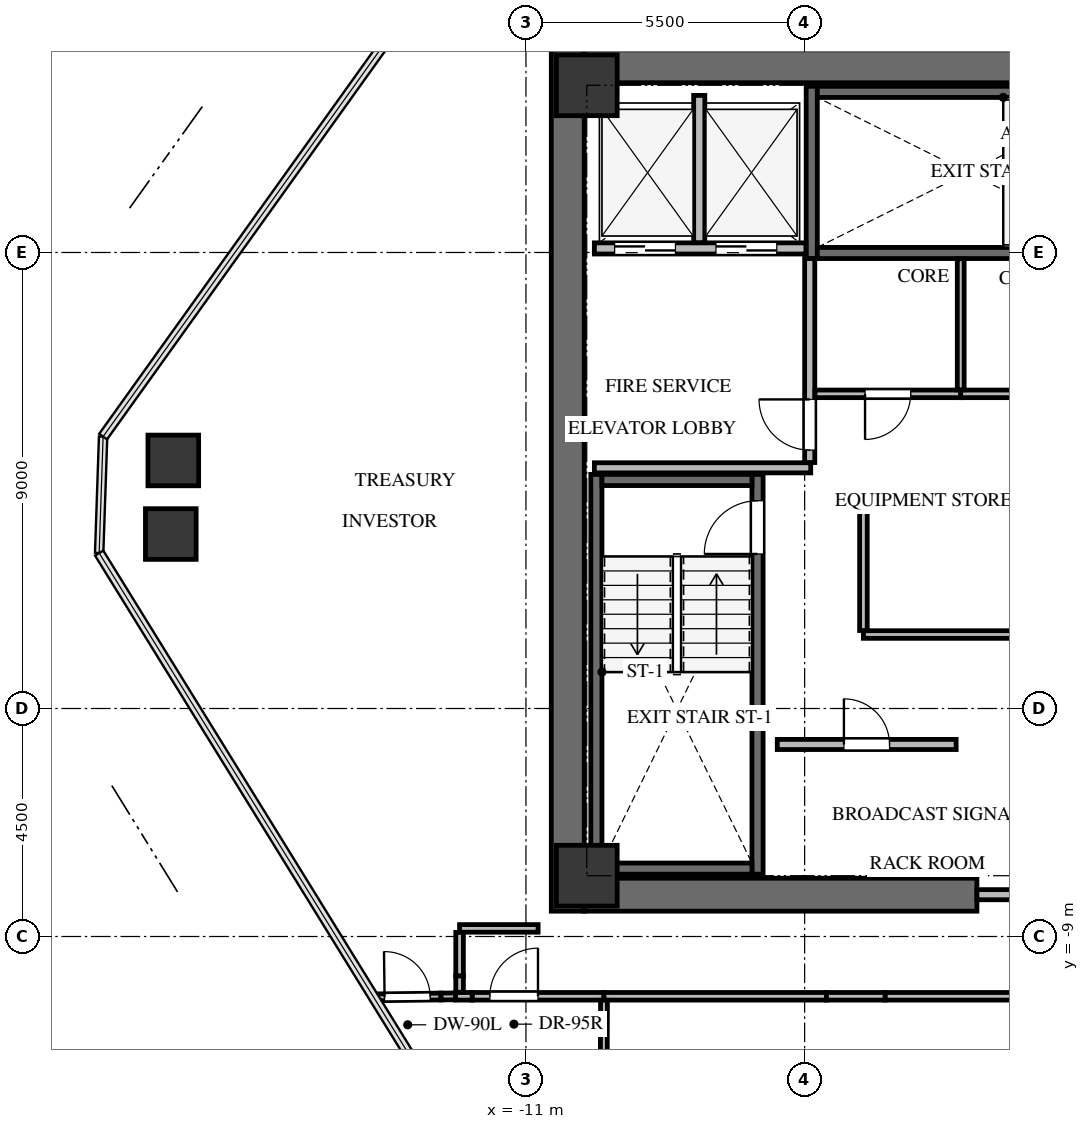
"""IFC4 building model, lengths in metres.
Left out: names, types, materials, properties, quantities, classifications, styles, units other than length and angle.
Written with IfcOpenShell. Run it as: python <this file> out.ifc"""

import sys

from ifc_helpers import new_model, si_unit, direction, frame, frame_2d, origin, origin_2d, place, context, subcontext, project, spatial, rectangle, extrude, source, transform, mapped, element, fill, save


model = new_model("IFC4")
c1 = context("Model", 3, precision=1e-05, world=origin(), true_north=direction((0.0, 1.0)))
c2 = subcontext(c1, "Body", "Model", "MODEL_VIEW")
j1 = project(units=[si_unit("LENGTHUNIT", "METRE"), si_unit("PLANEANGLEUNIT", "RADIAN")], contexts=[c1])
p1 = place(None, origin())
s1 = spatial("IfcSite", under=j1, at=p1, CompositionType="ELEMENT")
p2 = place(p1, origin())
s2 = spatial("IfcBuilding", under=s1, at=p2, CompositionType="ELEMENT")
p3 = place(p2, frame((0.0, 0.0, 200.2)))
s3 = spatial("IfcBuildingStorey", under=s2, at=p3, CompositionType="ELEMENT", Elevation=200.2)
p4 = place(p3, frame((-10.175, -8.5, 0.0), z_axis=(0.0, 0.0, 1.0), x_axis=(0.0, 1.0, 0.0)))
e1 = element("IfcWall", 1, at=p4, inside=s3, PredefinedType="SHEAR", context=c2, shape_type="SweptSolid", body=[
    extrude(rectangle(XDim=17.0, YDim=0.65, at=frame_2d((8.5, 0.0))), origin(), (0.0, 0.0, 1.0), 3.0),
])
p5 = place(p3, frame((-9.85, -8.175, 0.0), z_axis=(0.0, 0.0, 1.0), x_axis=(1.0, 0.0, 0.0)))
e2 = element("IfcWall", 2, at=p5, inside=s3, PredefinedType="SHEAR", context=c2, shape_type="SweptSolid", body=[
    extrude(rectangle(XDim=7.75, YDim=0.65, at=frame_2d((3.875, 0.0))), origin(), (0.0, 0.0, 1.0), 3.0),
])
p6 = place(p3, frame((-9.85, 8.175, 0.0), z_axis=(0.0, 0.0, 1.0), x_axis=(1.0, 0.0, 0.0)))
e3 = element("IfcWall", 3, at=p6, inside=s3, PredefinedType="SHEAR", context=c2, shape_type="SweptSolid", body=[
    extrude(rectangle(XDim=19.7, YDim=0.65, at=frame_2d((9.85, 0.0))), origin(), (0.0, 0.0, 1.0), 3.0),
])
p7 = place(p3, frame((-6.43, -7.77, -0.24), z_axis=(0.0, 0.0, 1.0), x_axis=(0.0, 1.0, 0.0)))
e4 = element("IfcWall", 4, at=p7, inside=s3, PredefinedType="SHEAR", context=c2, shape_type="SweptSolid", body=[
    extrude(rectangle(XDim=7.89, YDim=0.22, at=frame_2d((3.945, 0.0))), origin(), (0.0, 0.0, 1.0), 3.0),
])
p8 = place(p7, frame((6.32, 0.0, 0.0)))
e5 = element("IfcOpeningElement", 5, at=p8, cuts=e4, PredefinedType="OPENING", context=c2, shape_type="SweptSolid", body=[
    extrude(rectangle(XDim=1.05, YDim=2.15, at=frame_2d((0.525, 1.075))), frame((0.0, 0.12, 0.0), z_axis=(0.0, -1.0, 0.0), x_axis=(1.0, 0.0, 0.0)), (0.0, 0.0, 1.0), 0.24),
])
p9 = place(p3, frame((-9.61, 0.12, -0.24), z_axis=(0.0, 0.0, 1.0), x_axis=(0.0, -1.0, 0.0)))
e6 = element("IfcWall", 6, at=p9, inside=s3, PredefinedType="SHEAR", context=c2, shape_type="SweptSolid", body=[
    extrude(rectangle(XDim=7.89, YDim=0.22, at=frame_2d((3.945, 0.0))), origin(), (0.0, 0.0, 1.0), 3.0),
])
for number, where, z_axis, x_axis in (
    (7, (-9.5, -7.66, -0.24), (0.0, 0.0, 1.0), (1.0, 0.0, 0.0)),
    (8, (-6.54, 0.01, -0.24), (0.0, 0.0, 1.0), (-1.0, 0.0, 0.0)),
):
    element("IfcWall", number, at=place(p3, frame(where, z_axis=z_axis, x_axis=x_axis)), inside=s3, PredefinedType="SHEAR", context=c2, shape_type="SweptSolid", body=[
        extrude(rectangle(XDim=2.96, YDim=0.22, at=frame_2d((1.48, 0.0))), origin(), (0.0, 0.0, 1.0), 3.0),
    ])
p10 = place(p3, frame((-5.36, 7.78, -0.24), z_axis=(0.0, 0.0, 1.0), x_axis=(0.0, -1.0, 0.0)))
e9 = element("IfcWall", 9, at=p10, inside=s3, PredefinedType="SHEAR", context=c2, shape_type="SweptSolid", body=[
    extrude(rectangle(XDim=3.4, YDim=0.22, at=frame_2d((1.7, 0.0))), origin(), (0.0, 0.0, 1.0), 3.0),
])
p11 = place(p3, frame((-5.25, 4.49, -0.24), z_axis=(0.0, 0.0, 1.0), x_axis=(1.0, 0.0, 0.0)))
e10 = element("IfcWall", 10, at=p11, inside=s3, PredefinedType="SHEAR", context=c2, shape_type="SweptSolid", body=[
    extrude(rectangle(XDim=7.35, YDim=0.22, at=frame_2d((3.675, 0.0))), origin(), (0.0, 0.0, 1.0), 3.0),
])
p12 = place(p11, frame((5.85, 0.0, 0.0)))
e11 = element("IfcOpeningElement", 11, at=p12, cuts=e10, PredefinedType="OPENING", context=c2, shape_type="SweptSolid", body=[
    extrude(rectangle(XDim=1.05, YDim=2.15, at=frame_2d((0.525, 1.075))), frame((0.0, 0.12, 0.0), z_axis=(0.0, -1.0, 0.0), x_axis=(1.0, 0.0, 0.0)), (0.0, 0.0, 1.0), 0.24),
])
p13 = place(p3, frame((2.1, 7.67, -0.24), z_axis=(0.0, 0.0, 1.0), x_axis=(-1.0, 0.0, 0.0)))
e12 = element("IfcWall", 12, at=p13, inside=s3, PredefinedType="SHEAR", context=c2, shape_type="SweptSolid", body=[
    extrude(rectangle(XDim=7.35, YDim=0.22, at=frame_2d((3.675, 0.0))), origin(), (0.0, 0.0, 1.0), 3.0),
])
m1 = source(origin(), c2, "Body", "SweptSolid", [
    extrude(rectangle(XDim=1.2, YDim=1.2, at=origin_2d()), origin(), (0.0, 0.0, 1.0), 3.0),
])
for number, where, z_axis, x_axis in (
    (13, (-9.8, -7.8, -0.24), (0.0, 0.0, 1.0), (1.0, 0.0, 0.0)),
    (14, (-9.8, 7.8, -0.24), (0.0, 0.0, 1.0), (1.0, 0.0, 0.0)),
):
    element("IfcColumn", number, at=place(p3, frame(where, z_axis=z_axis, x_axis=x_axis)), inside=s3, PredefinedType="COLUMN", context=c2, shape_type="MappedRepresentation", body=[
        mapped(m1, transform((0.0, 0.0, 0.0), x_axis=(1.0, 0.0, 0.0), y_axis=(0.0, 1.0, 0.0), z_axis=(0.0, 0.0, 1.0), scale=1.0)),
    ])
m2 = source(origin(), c2, "Body", "SweptSolid", [
    extrude(rectangle(XDim=1.0, YDim=1.0, at=origin_2d()), origin(), (0.0, 0.0, 1.0), 3.0),
])
for number, where, z_axis, x_axis in (
    (15, (-18.009, -1.057, -0.24), (0.0, 0.0, 1.0), (1.0, 0.0, 0.0)),
    (16, (-17.96, 0.396, -0.24), (0.0, 0.0, 1.0), (1.0, 0.0, 0.0)),
):
    element("IfcColumn", number, at=place(p3, frame(where, z_axis=z_axis, x_axis=x_axis)), inside=s3, PredefinedType="COLUMN", context=c2, shape_type="MappedRepresentation", body=[
        mapped(m2, transform((0.0, 0.0, 0.0), x_axis=(1.0, 0.0, 0.0), y_axis=(0.0, 1.0, 0.0), z_axis=(0.0, 0.0, 1.0), scale=1.0)),
    ])
p14 = place(p3, frame((-2.1, -8.175, 0.0), z_axis=(0.0, 0.0, 1.0), x_axis=(1.0, 0.0, 0.0)))
e17 = element("IfcWall", 17, at=p14, inside=s3, PredefinedType="SOLIDWALL", context=c2, shape_type="SweptSolid", body=[
    extrude(rectangle(XDim=4.2, YDim=0.2, at=frame_2d((2.1, 0.0))), origin(), (0.0, 0.0, 1.0), 2.745),
])
p15 = place(p14, frame((1.2, 0.0, 0.0)))
e18 = element("IfcOpeningElement", 18, at=p15, cuts=e17, PredefinedType="OPENING", context=c2, shape_type="SweptSolid", body=[
    extrude(rectangle(XDim=1.8, YDim=2.15, at=frame_2d((0.9, 1.075))), frame((0.0, 0.11, 0.0), z_axis=(0.0, -1.0, 0.0), x_axis=(1.0, 0.0, 0.0)), (0.0, 0.0, 1.0), 0.22),
])
p16 = place(p3, frame((-9.65, 4.58, 0.0), z_axis=(0.0, 0.0, 1.0), x_axis=(1.0, 0.0, 0.0)))
e19 = element("IfcWall", 19, at=p16, inside=s3, PredefinedType="SOLIDWALL", context=c2, shape_type="SweptSolid", body=[
    extrude(rectangle(XDim=4.175, YDim=0.22, at=frame_2d((2.087, 0.0))), origin(), (0.0, 0.0, 1.0), 2.745),
])
p17 = place(p16, frame((0.4, 0.0, 0.0)))
e20 = element("IfcOpeningElement", 20, at=p17, cuts=e19, PredefinedType="OPENING", context=c2, shape_type="SweptSolid", body=[
    extrude(rectangle(XDim=1.2, YDim=2.15, at=frame_2d((0.6, 1.075))), frame((0.0, 0.12, 0.0), z_axis=(0.0, -1.0, 0.0), x_axis=(1.0, 0.0, 0.0)), (0.0, 0.0, 1.0), 0.24),
])
p18 = place(p16, frame((2.4, 0.0, 0.0)))
e21 = element("IfcOpeningElement", 21, at=p18, cuts=e19, PredefinedType="OPENING", context=c2, shape_type="SweptSolid", body=[
    extrude(rectangle(XDim=1.2, YDim=2.15, at=frame_2d((0.6, 1.075))), frame((0.0, 0.12, 0.0), z_axis=(0.0, -1.0, 0.0), x_axis=(1.0, 0.0, 0.0)), (0.0, 0.0, 1.0), 0.24),
])
p19 = place(p3, frame((-7.58, 4.694, 0.0), z_axis=(0.0, 0.0, 1.0), x_axis=(0.0, 1.0, 0.0)))
e22 = element("IfcWall", 22, at=p19, inside=s3, PredefinedType="SOLIDWALL", context=c2, shape_type="SweptSolid", body=[
    extrude(rectangle(XDim=2.906, YDim=0.22, at=frame_2d((1.453, 0.0))), origin(), (0.0, 0.0, 1.0), 2.745),
])
p20 = place(p3, frame((-9.65, 0.25, 0.0), z_axis=(0.0, 0.0, 1.0), x_axis=(1.0, 0.0, 0.0)))
e23 = element("IfcWall", 23, at=p20, inside=s3, PredefinedType="SOLIDWALL", context=c2, shape_type="SweptSolid", body=[
    extrude(rectangle(XDim=4.27, YDim=0.2, at=frame_2d((2.135, 0.0))), origin(), (0.0, 0.0, 1.0), 2.745),
])
p21 = place(p3, frame((-5.4, 0.354, 0.0), z_axis=(0.0, 0.0, 1.0), x_axis=(0.0, 1.0, 0.0)))
e24 = element("IfcWall", 24, at=p21, inside=s3, PredefinedType="SOLIDWALL", context=c2, shape_type="SweptSolid", body=[
    extrude(rectangle(XDim=4.026, YDim=0.2, at=frame_2d((2.013, 0.0))), origin(), (0.0, 0.0, 1.0), 2.745),
])
p22 = place(p21, frame((0.246, 0.0, 0.0)))
e25 = element("IfcOpeningElement", 25, at=p22, cuts=e24, PredefinedType="OPENING", context=c2, shape_type="SweptSolid", body=[
    extrude(rectangle(XDim=1.0, YDim=2.15, at=frame_2d((0.5, 1.075))), frame((0.0, 0.11, 0.0), z_axis=(0.0, -1.0, 0.0), x_axis=(1.0, 0.0, 0.0)), (0.0, 0.0, 1.0), 0.22),
])
p23 = place(p3, frame((-6.04, -5.21, 0.0), z_axis=(0.0, 0.0, 1.0), x_axis=(1.0, 0.0, 0.0)))
e26 = element("IfcWall", 26, at=p23, inside=s3, PredefinedType="SOLIDWALL", context=c2, shape_type="SweptSolid", body=[
    extrude(rectangle(XDim=3.53, YDim=0.2, at=frame_2d((1.765, 0.0))), origin(), (0.0, 0.0, 1.0), 2.745),
])
p24 = place(p23, frame((1.315, 0.0, 0.0)))
e27 = element("IfcOpeningElement", 27, at=p24, cuts=e26, PredefinedType="OPENING", context=c2, shape_type="SweptSolid", body=[
    extrude(rectangle(XDim=0.9, YDim=2.05, at=frame_2d((0.45, 1.025))), frame((0.0, 0.11, 0.0), z_axis=(0.0, -1.0, 0.0), x_axis=(1.0, 0.0, 0.0)), (0.0, 0.0, 1.0), 0.22),
])
p25 = place(p3, frame((3.14, -3.04, 0.0), z_axis=(0.0, 0.0, 1.0), x_axis=(-1.0, 0.0, 0.0)))
e28 = element("IfcWall", 28, at=p25, inside=s3, PredefinedType="PARTITIONING", context=c2, shape_type="SweptSolid", body=[
    extrude(rectangle(XDim=7.48, YDim=0.15, at=frame_2d((3.74, 0.0))), origin(), (0.0, 0.0, 1.0), 2.745),
])
p26 = place(p25, frame((3.29, 0.0, 0.0)))
e29 = element("IfcOpeningElement", 29, at=p26, cuts=e28, PredefinedType="OPENING", context=c2, shape_type="SweptSolid", body=[
    extrude(rectangle(XDim=0.9, YDim=2.05, at=frame_2d((0.45, 1.025))), frame((0.0, 0.085, 0.0), z_axis=(0.0, -1.0, 0.0), x_axis=(1.0, 0.0, 0.0)), (0.0, 0.0, 1.0), 0.17),
])
p27 = place(p3, frame((-4.34, -0.51, 0.0), z_axis=(0.0, 0.0, 1.0), x_axis=(1.0, 0.0, 0.0)))
e30 = element("IfcWall", 30, at=p27, inside=s3, PredefinedType="PARTITIONING", context=c2, shape_type="SweptSolid", body=[
    extrude(rectangle(XDim=7.48, YDim=0.15, at=frame_2d((3.74, 0.0))), origin(), (0.0, 0.0, 1.0), 2.745),
])
p28 = place(p3, frame((-4.34, -2.961, 0.0), z_axis=(0.0, 0.0, 1.0), x_axis=(0.0, 1.0, 0.0)))
e31 = element("IfcWall", 31, at=p28, inside=s3, PredefinedType="PARTITIONING", context=c2, shape_type="SweptSolid", body=[
    extrude(rectangle(XDim=2.372, YDim=0.15, at=frame_2d((1.186, 0.0))), origin(), (0.0, 0.0, 1.0), 2.745),
])
p29 = place(p3, frame((-2.42, 1.71, 0.0), z_axis=(0.0, 0.0, 1.0), x_axis=(-1.0, 0.0, 0.0)))
e32 = element("IfcWall", 32, at=p29, inside=s3, PredefinedType="PARTITIONING", context=c2, shape_type="SweptSolid", body=[
    extrude(rectangle(XDim=2.876, YDim=0.15, at=frame_2d((1.438, 0.0))), origin(), (0.0, 0.0, 1.0), 2.745),
])
p30 = place(p29, frame((0.988, 0.0, 0.0)))
e33 = element("IfcOpeningElement", 33, at=p30, cuts=e32, PredefinedType="OPENING", context=c2, shape_type="SweptSolid", body=[
    extrude(rectangle(XDim=0.9, YDim=2.05, at=frame_2d((0.45, 1.025))), frame((0.0, 0.085, 0.0), z_axis=(0.0, -1.0, 0.0), x_axis=(1.0, 0.0, 0.0)), (0.0, 0.0, 1.0), 0.17),
])
p31 = place(p3, frame((0.52, 1.71, 0.0), z_axis=(0.0, 0.0, 1.0), x_axis=(-1.0, 0.0, 0.0)))
e34 = element("IfcWall", 34, at=p31, inside=s3, PredefinedType="PARTITIONING", context=c2, shape_type="SweptSolid", body=[
    extrude(rectangle(XDim=2.94, YDim=0.15, at=frame_2d((1.47, 0.0))), origin(), (0.0, 0.0, 1.0), 2.745),
])
p32 = place(p31, frame((1.02, 0.0, 0.0)))
e35 = element("IfcOpeningElement", 35, at=p32, cuts=e34, PredefinedType="OPENING", context=c2, shape_type="SweptSolid", body=[
    extrude(rectangle(XDim=0.9, YDim=2.05, at=frame_2d((0.45, 1.025))), frame((0.0, 0.085, 0.0), z_axis=(0.0, -1.0, 0.0), x_axis=(1.0, 0.0, 0.0)), (0.0, 0.0, 1.0), 0.17),
])
p33 = place(p3, frame((-12.062, -10.18, 0.0), z_axis=(0.0, 0.0, 1.0), x_axis=(1.0, 0.0, 0.0)))
e36 = element("IfcWall", 36, at=p33, inside=s3, PredefinedType="PARTITIONING", context=c2, shape_type="SweptSolid", body=[
    extrude(rectangle(XDim=2.603, YDim=0.15, at=frame_2d((1.301, 0.0))), origin(), (0.0, 0.0, 1.0), 2.745),
])
p34 = place(p33, frame((0.35, 0.0, 0.0)))
e37 = element("IfcOpeningElement", 37, at=p34, cuts=e36, PredefinedType="OPENING", context=c2, shape_type="SweptSolid", body=[
    extrude(rectangle(XDim=0.95, YDim=2.1, at=frame_2d((0.475, 1.05))), frame((0.0, 0.085, 0.0), z_axis=(0.0, -1.0, 0.0), x_axis=(1.0, 0.0, 0.0)), (0.0, 0.0, 1.0), 0.17),
])
p35 = place(p3, frame((-12.39, -10.18, 0.0), z_axis=(0.0, 0.0, 1.0), x_axis=(1.0, 0.0, 0.0)))
e38 = element("IfcWall", 38, at=p35, inside=s3, PredefinedType="PARTITIONING", context=c2, shape_type="SweptSolid", body=[
    extrude(rectangle(XDim=0.327, YDim=0.15, at=frame_2d((0.164, 0.0))), origin(), (0.0, 0.0, 1.0), 2.099),
])
p36 = place(p3, frame((-9.46, -10.18, 0.0), z_axis=(0.0, 0.0, 1.0), x_axis=(1.0, 0.0, 0.0)))
e39 = element("IfcWall", 39, at=p36, inside=s3, PredefinedType="PARTITIONING", context=c2, shape_type="SweptSolid", body=[
    extrude(rectangle(XDim=4.39, YDim=0.15, at=frame_2d((2.195, 0.0))), origin(), (0.0, 0.0, 1.0), 2.745),
])
p37 = place(p3, frame((-3.913, -10.18, 0.0), z_axis=(0.0, 0.0, 1.0), x_axis=(1.0, 0.0, 0.0)))
e40 = element("IfcWall", 40, at=p37, inside=s3, PredefinedType="PARTITIONING", context=c2, shape_type="SweptSolid", body=[
    extrude(rectangle(XDim=2.903, YDim=0.15, at=frame_2d((1.451, 0.0))), origin(), (0.0, 0.0, 1.0), 2.745),
])
p38 = place(p3, frame((-5.07, -10.18, 0.0), z_axis=(0.0, 0.0, 1.0), x_axis=(1.0, 0.0, 0.0)))
e41 = element("IfcWall", 41, at=p38, inside=s3, PredefinedType="PARTITIONING", context=c2, shape_type="SweptSolid", body=[
    extrude(rectangle(XDim=1.157, YDim=0.15, at=frame_2d((0.579, 0.0))), origin(), (0.0, 0.0, 1.0), 1.942),
])
p39 = place(p3, frame((-10.76, -8.84, 0.0), z_axis=(0.0, 0.0, 1.0), x_axis=(-1.0, 0.0, 0.0)))
e42 = element("IfcWall", 42, at=p39, inside=s3, PredefinedType="PARTITIONING", context=c2, shape_type="SweptSolid", body=[
    extrude(rectangle(XDim=1.55, YDim=0.15, at=frame_2d((0.775, 0.0))), origin(), (0.0, 0.0, 1.0), 2.745),
])
p40 = place(p3, frame((-12.31, -8.919, 0.0), z_axis=(0.0, 0.0, 1.0), x_axis=(0.0, -1.0, 0.0)))
e43 = element("IfcWall", 43, at=p40, inside=s3, PredefinedType="PARTITIONING", context=c2, shape_type="SweptSolid", body=[
    extrude(rectangle(XDim=0.86, YDim=0.15, at=frame_2d((0.43, 0.0))), origin(), (0.0, 0.0, 1.0), 2.099),
])
p41 = place(p3, frame((-12.31, -9.779, 0.0), z_axis=(0.0, 0.0, 1.0), x_axis=(0.0, -1.0, 0.0)))
e44 = element("IfcWall", 44, at=p41, inside=s3, PredefinedType="PARTITIONING", context=c2, shape_type="SweptSolid", body=[
    extrude(rectangle(XDim=0.322, YDim=0.15, at=frame_2d((0.161, 0.0))), origin(), (0.0, 0.0, 1.0), 2.099),
])
p42 = place(p3, frame((-2.42, 4.375, 0.0), z_axis=(0.0, 0.0, 1.0), x_axis=(0.0, -1.0, 0.0)))
e45 = element("IfcWall", 45, at=p42, inside=s3, PredefinedType="PARTITIONING", context=c2, shape_type="SweptSolid", body=[
    extrude(rectangle(XDim=2.586, YDim=0.135, at=frame_2d((1.293, 0.0))), origin(), (0.0, 0.0, 1.0), 2.745),
])
p43 = place(p3, frame((-9.46, -10.259, 0.0), z_axis=(0.0, 0.0, 1.0), x_axis=(-0.002849160395, -0.999995941134, 0.0)))
e46 = element("IfcWall", 46, at=p43, inside=s3, PredefinedType="PARTITIONING", context=c2, shape_type="SweptSolid", body=[
    extrude(rectangle(XDim=4.113, YDim=0.135, at=frame_2d((2.057, 0.0))), origin(), (0.0, 0.0, 1.0), 2.099),
])
p44 = place(p3, frame((-14.004, -10.201, 0.0), z_axis=(0.0, 0.0, 1.0), x_axis=(0.999924024946, 0.012326570317, 0.0)))
e47 = element("IfcWall", 47, at=p44, inside=s3, PredefinedType="PARTITIONING", context=c2, shape_type="SweptSolid", body=[
    extrude(rectangle(XDim=1.327, YDim=0.135, at=frame_2d((0.664, 0.0))), origin(), (0.0, 0.0, 1.0), 2.745),
])
p45 = place(p44, frame((0.214, 0.0, 0.0)))
e48 = element("IfcOpeningElement", 48, at=p45, cuts=e47, PredefinedType="OPENING", context=c2, shape_type="SweptSolid", body=[
    extrude(rectangle(XDim=0.9, YDim=2.05, at=frame_2d((0.45, 1.025))), frame((0.0, 0.078, 0.0), z_axis=(0.0, -1.0, 0.0), x_axis=(1.0, 0.0, 0.0)), (0.0, 0.0, 1.0), 0.155),
])
p46 = place(p3, frame((-12.677, -10.185, 0.0), z_axis=(0.0, 0.0, 1.0), x_axis=(0.99991866361, 0.012754064587, 0.0)))
e49 = element("IfcWall", 49, at=p46, inside=s3, PredefinedType="PARTITIONING", context=c2, shape_type="SweptSolid", body=[
    extrude(rectangle(XDim=0.287, YDim=0.135, at=frame_2d((0.144, 0.0))), origin(), (0.0, 0.0, 1.0), 2.099),
])
m3 = source(origin(), c2, "Body", "SweptSolid", [
    extrude(rectangle(XDim=1.05, YDim=2.15, at=frame_2d((0.525, 1.075))), frame((0.0, 0.025, 0.0), z_axis=(0.0, -1.0, 0.0), x_axis=(1.0, 0.0, 0.0)), (0.0, 0.0, 1.0), 0.05),
])
p47 = place(p8, origin())
e50 = element("IfcDoor", 50, at=p47, inside=s3, OperationType="SINGLE_SWING_LEFT", PredefinedType="DOOR", context=c2, shape_type="MappedRepresentation", body=[
    mapped(m3, transform((0.0, 0.0, 0.0), x_axis=(1.0, 0.0, 0.0), y_axis=(0.0, 1.0, 0.0), z_axis=(0.0, 0.0, 1.0), scale=1.0)),
])
fill(e5, e50)
m4 = source(origin(), c2, "Body", "SweptSolid", [
    extrude(rectangle(XDim=1.2, YDim=2.15, at=frame_2d((0.6, 1.075))), frame((0.0, 0.025, 0.0), z_axis=(0.0, -1.0, 0.0), x_axis=(1.0, 0.0, 0.0)), (0.0, 0.0, 1.0), 0.05),
])
p48 = place(p17, origin())
e51 = element("IfcDoor", 51, at=p48, inside=s3, OperationType="DOUBLE_DOOR_SLIDING", PredefinedType="DOOR", context=c2, shape_type="MappedRepresentation", body=[
    mapped(m4, transform((0.0, 0.0, 0.0), x_axis=(1.0, 0.0, 0.0), y_axis=(0.0, 1.0, 0.0), z_axis=(0.0, 0.0, 1.0), scale=1.0)),
])
fill(e20, e51)
p49 = place(p18, origin())
e52 = element("IfcDoor", 52, at=p49, inside=s3, OperationType="DOUBLE_DOOR_SLIDING", PredefinedType="DOOR", context=c2, shape_type="MappedRepresentation", body=[
    mapped(m4, transform((0.0, 0.0, 0.0), x_axis=(1.0, 0.0, 0.0), y_axis=(0.0, 1.0, 0.0), z_axis=(0.0, 0.0, 1.0), scale=1.0)),
])
fill(e21, e52)
m5 = source(origin(), c2, "Body", "SweptSolid", [
    extrude(rectangle(XDim=1.0, YDim=2.15, at=frame_2d((0.5, 1.075))), frame((0.0, 0.025, 0.0), z_axis=(0.0, -1.0, 0.0), x_axis=(1.0, 0.0, 0.0)), (0.0, 0.0, 1.0), 0.05),
])
p50 = place(p22, origin())
e53 = element("IfcDoor", 53, at=p50, inside=s3, OperationType="SINGLE_SWING_RIGHT", PredefinedType="DOOR", context=c2, shape_type="MappedRepresentation", body=[
    mapped(m5, transform((0.0, 0.0, 0.0), x_axis=(1.0, 0.0, 0.0), y_axis=(0.0, 1.0, 0.0), z_axis=(0.0, 0.0, 1.0), scale=1.0)),
])
fill(e25, e53)
m6 = source(origin(), c2, "Body", "SweptSolid", [
    extrude(rectangle(XDim=0.9, YDim=2.05, at=frame_2d((0.45, 1.025))), frame((0.0, 0.025, 0.0), z_axis=(0.0, -1.0, 0.0), x_axis=(1.0, 0.0, 0.0)), (0.0, 0.0, 1.0), 0.05),
])
p51 = place(p24, origin())
e54 = element("IfcDoor", 54, at=p51, inside=s3, OperationType="SINGLE_SWING_LEFT", PredefinedType="DOOR", context=c2, shape_type="MappedRepresentation", body=[
    mapped(m6, transform((0.0, 0.0, 0.0), x_axis=(1.0, 0.0, 0.0), y_axis=(0.0, 1.0, 0.0), z_axis=(0.0, 0.0, 1.0), scale=1.0)),
])
fill(e27, e54)
m7 = source(origin(), c2, "Body", "SweptSolid", [
    extrude(rectangle(XDim=0.9, YDim=2.05, at=frame_2d((0.45, 1.025))), frame((0.0, 0.025, 0.0), z_axis=(0.0, -1.0, 0.0), x_axis=(1.0, 0.0, 0.0)), (0.0, 0.0, 1.0), 0.05),
])
p52 = place(p30, origin())
e55 = element("IfcDoor", 55, at=p52, inside=s3, OperationType="SINGLE_SWING_RIGHT", PredefinedType="DOOR", context=c2, shape_type="MappedRepresentation", body=[
    mapped(m7, transform((0.0, 0.0, 0.0), x_axis=(1.0, 0.0, 0.0), y_axis=(0.0, 1.0, 0.0), z_axis=(0.0, 0.0, 1.0), scale=1.0)),
])
fill(e33, e55)
m8 = source(origin(), c2, "Body", "SweptSolid", [
    extrude(rectangle(XDim=0.95, YDim=2.1, at=frame_2d((0.475, 1.05))), frame((0.0, 0.025, 0.0), z_axis=(0.0, -1.0, 0.0), x_axis=(1.0, 0.0, 0.0)), (0.0, 0.0, 1.0), 0.05),
])
p53 = place(p34, origin())
e56 = element("IfcDoor", 56, at=p53, inside=s3, OperationType="SINGLE_SWING_RIGHT", PredefinedType="DOOR", context=c2, shape_type="MappedRepresentation", body=[
    mapped(m8, transform((0.0, 0.0, 0.0), x_axis=(1.0, 0.0, 0.0), y_axis=(0.0, 1.0, 0.0), z_axis=(0.0, 0.0, 1.0), scale=1.0)),
])
fill(e37, e56)
m9 = source(origin(), c2, "Body", "SweptSolid", [
    extrude(rectangle(XDim=0.9, YDim=2.05, at=frame_2d((0.45, 1.025))), frame((0.0, 0.025, 0.0), z_axis=(0.0, -1.0, 0.0), x_axis=(1.0, 0.0, 0.0)), (0.0, 0.0, 1.0), 0.05),
])
p54 = place(p45, origin())
e57 = element("IfcDoor", 57, at=p54, inside=s3, OperationType="SINGLE_SWING_LEFT", PredefinedType="DOOR", context=c2, shape_type="MappedRepresentation", body=[
    mapped(m9, transform((0.0, 0.0, 0.0), x_axis=(1.0, 0.0, 0.0), y_axis=(0.0, 1.0, 0.0), z_axis=(0.0, 0.0, 1.0), scale=1.0)),
])
fill(e48, e57)
save(model, sys.argv[1])
